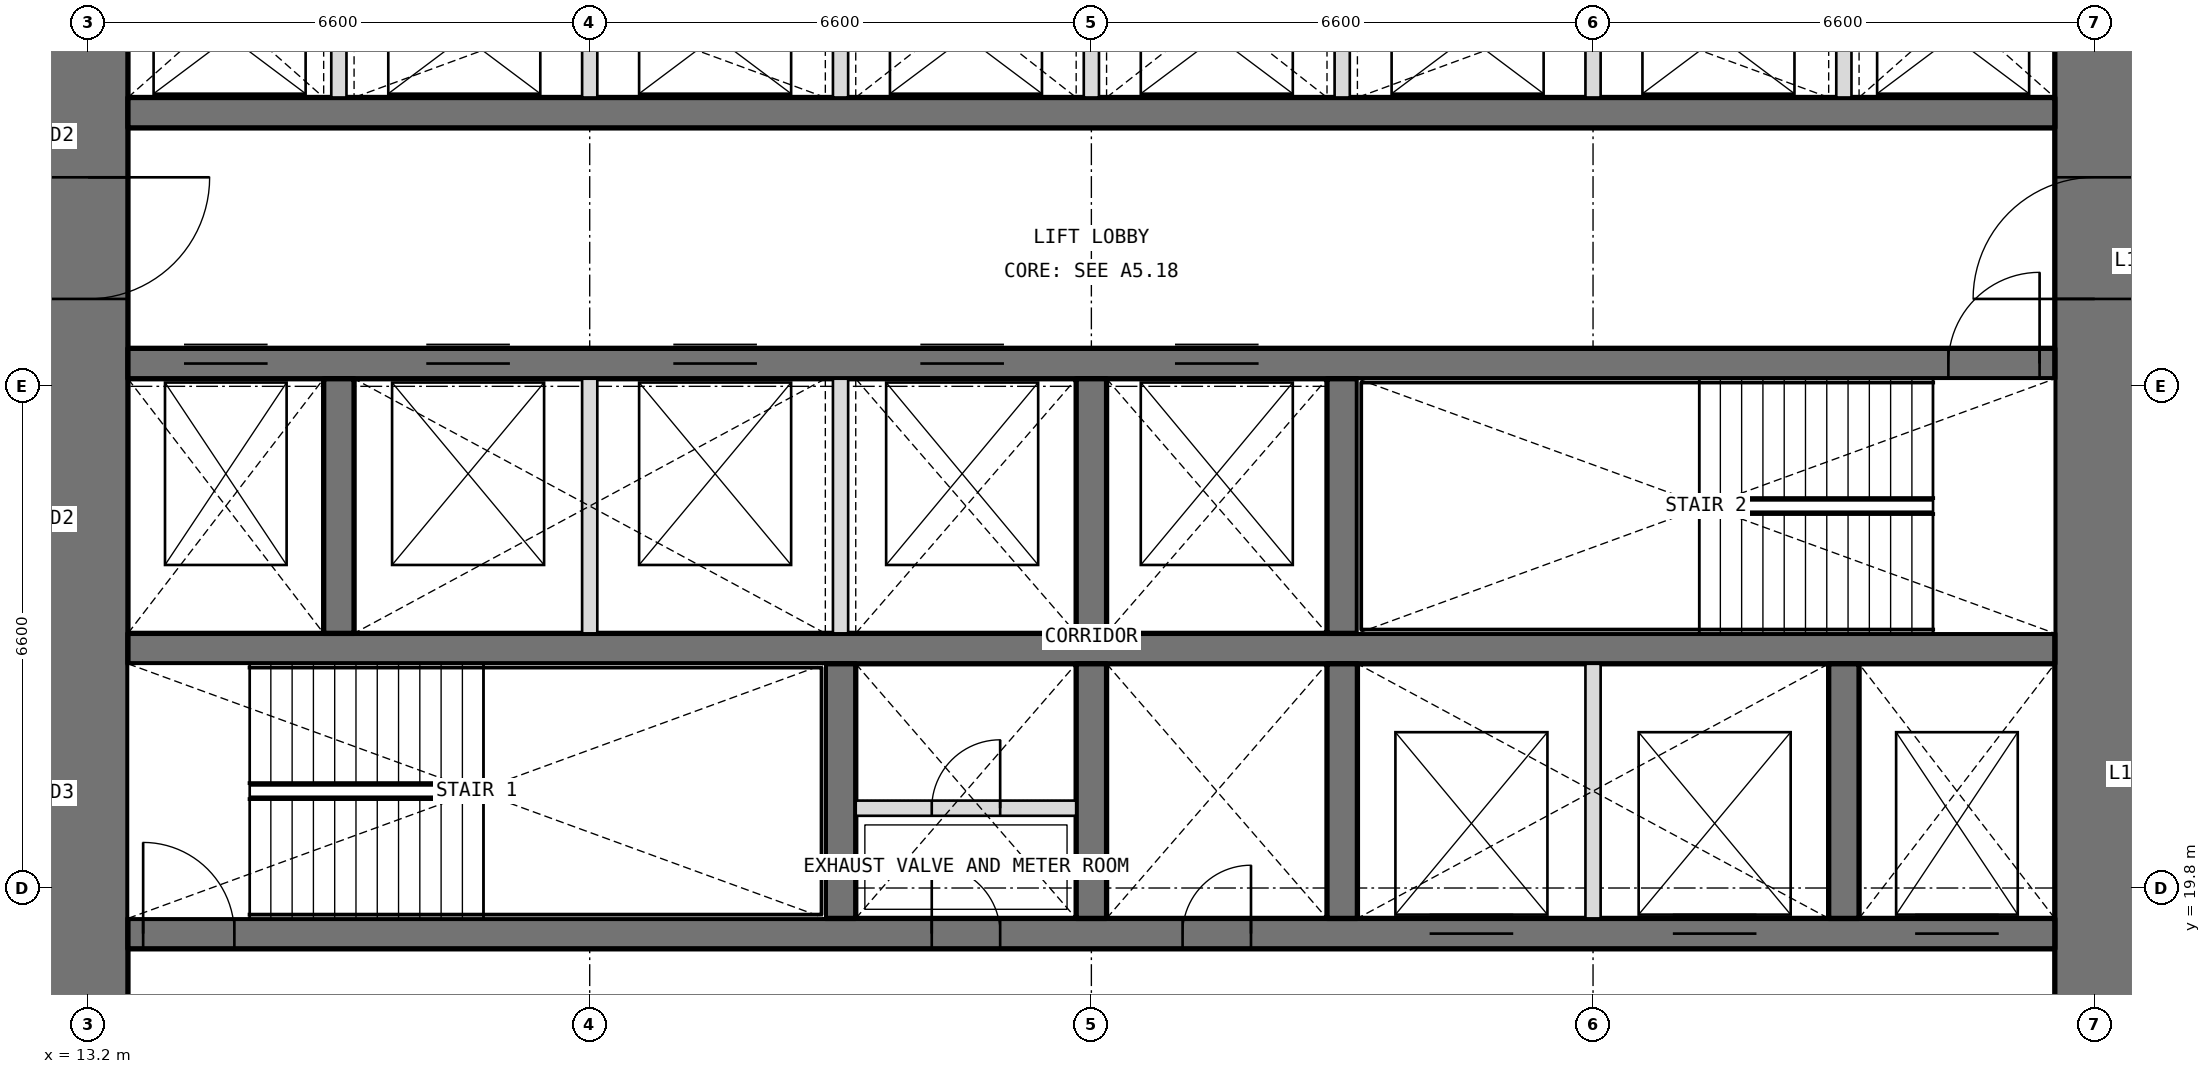
"""IFC4 building model, lengths in metres.
Left out: names, types, materials, properties, quantities, classifications, styles, units other than length and angle.
Written with IfcOpenShell. Run it as: python <this file> out.ifc"""

import sys

from ifc_helpers import new_model, si_unit, direction, frame, frame_2d, origin, place, context, subcontext, project, spatial, rectangle, extrude, element, fill, save


model = new_model("IFC4")
c1 = context("Model", 3, precision=1e-05, world=origin(), true_north=direction((0.0, 1.0)))
c2 = subcontext(c1, "Body", "Model", "MODEL_VIEW")
j1 = project(units=[si_unit("LENGTHUNIT", "METRE"), si_unit("PLANEANGLEUNIT", "RADIAN")], contexts=[c1])
p1 = place(None, origin())
s1 = spatial("IfcSite", under=j1, at=p1, CompositionType="ELEMENT")
p2 = place(p1, origin())
s2 = spatial("IfcBuilding", under=s1, at=p2, CompositionType="ELEMENT")
p3 = place(p2, frame((0.0, 0.0, 71.7)))
s3 = spatial("IfcBuildingStorey", under=s2, at=p3, CompositionType="ELEMENT", Elevation=71.7)
p4 = place(p3, frame((39.6, 13.725, 0.0), z_axis=(0.0, 0.0, 1.0), x_axis=(0.0, 1.0, 0.0)))
e1 = element("IfcWall", 1, at=p4, inside=s3, PredefinedType="SHEAR", context=c2, shape_type="SweptSolid", body=[
    extrude(rectangle(XDim=18.75, YDim=1.05, at=frame_2d((9.375, 0.0))), origin(), (0.0, 0.0, 1.0), 4.2),
])
p5 = place(p4, frame((3.025, 0.0, 0.0)))
e2 = element("IfcOpeningElement", 2, at=p5, cuts=e1, PredefinedType="OPENING", context=c2, shape_type="SweptSolid", body=[
    extrude(rectangle(XDim=1.6, YDim=2.1, at=frame_2d((0.8, 1.05))), frame((0.0, 0.535, 0.0), z_axis=(0.0, -1.0, 0.0), x_axis=(1.0, 0.0, 0.0)), (0.0, 0.0, 1.0), 1.07),
])
p6 = place(p4, frame((13.825, 0.0, 0.0)))
e3 = element("IfcOpeningElement", 3, at=p6, cuts=e1, PredefinedType="OPENING", context=c2, shape_type="SweptSolid", body=[
    extrude(rectangle(XDim=1.6, YDim=2.1, at=frame_2d((0.8, 1.05))), frame((0.0, 0.535, 0.0), z_axis=(0.0, -1.0, 0.0), x_axis=(1.0, 0.0, 0.0)), (0.0, 0.0, 1.0), 1.07),
])
p7 = place(p3, frame((13.2, 32.475, 0.0), z_axis=(0.0, 0.0, 1.0), x_axis=(0.0, -1.0, 0.0)))
e4 = element("IfcWall", 4, at=p7, inside=s3, PredefinedType="SHEAR", context=c2, shape_type="SweptSolid", body=[
    extrude(rectangle(XDim=18.75, YDim=1.05, at=frame_2d((9.375, 0.0))), origin(), (0.0, 0.0, 1.0), 4.2),
])
p8 = place(p7, frame((14.125, 0.0, 0.0)))
e5 = element("IfcOpeningElement", 5, at=p8, cuts=e4, PredefinedType="OPENING", context=c2, shape_type="SweptSolid", body=[
    extrude(rectangle(XDim=1.6, YDim=2.1, at=frame_2d((0.8, 1.05))), frame((0.0, 0.535, 0.0), z_axis=(0.0, -1.0, 0.0), x_axis=(1.0, 0.0, 0.0)), (0.0, 0.0, 1.0), 1.07),
])
p9 = place(p7, frame((3.325, 0.0, 0.0)))
e6 = element("IfcOpeningElement", 6, at=p9, cuts=e4, PredefinedType="OPENING", context=c2, shape_type="SweptSolid", body=[
    extrude(rectangle(XDim=1.6, YDim=2.1, at=frame_2d((0.8, 1.05))), frame((0.0, 0.535, 0.0), z_axis=(0.0, -1.0, 0.0), x_axis=(1.0, 0.0, 0.0)), (0.0, 0.0, 1.0), 1.07),
])
p10 = place(p3, frame((13.725, 19.2, 0.0), z_axis=(0.0, 0.0, 1.0), x_axis=(1.0, 0.0, 0.0)))
e7 = element("IfcWall", 7, at=p10, inside=s3, PredefinedType="SHEAR", context=c2, shape_type="SweptSolid", body=[
    extrude(rectangle(XDim=25.35, YDim=0.4, at=frame_2d((12.675, 0.0))), origin(), (0.0, 0.0, 1.0), 4.2),
])
p11 = place(p10, frame((10.575, 0.0, 0.0)))
e8 = element("IfcOpeningElement", 8, at=p11, cuts=e7, PredefinedType="OPENING", context=c2, shape_type="SweptSolid", body=[
    extrude(rectangle(XDim=0.9, YDim=2.1, at=frame_2d((0.45, 1.05))), frame((0.0, 0.21, 0.0), z_axis=(0.0, -1.0, 0.0), x_axis=(1.0, 0.0, 0.0)), (0.0, 0.0, 1.0), 0.42),
])
p12 = place(p10, frame((13.875, 0.0, 0.0)))
e9 = element("IfcOpeningElement", 9, at=p12, cuts=e7, PredefinedType="OPENING", context=c2, shape_type="SweptSolid", body=[
    extrude(rectangle(XDim=0.9, YDim=2.1, at=frame_2d((0.45, 1.05))), frame((0.0, 0.21, 0.0), z_axis=(0.0, -1.0, 0.0), x_axis=(1.0, 0.0, 0.0)), (0.0, 0.0, 1.0), 0.42),
])
p13 = place(p10, frame((0.2, 0.0, 0.0)))
e10 = element("IfcOpeningElement", 10, at=p13, cuts=e7, PredefinedType="OPENING", context=c2, shape_type="SweptSolid", body=[
    extrude(rectangle(XDim=1.2, YDim=2.1, at=frame_2d((0.6, 1.05))), frame((0.0, 0.21, 0.0), z_axis=(0.0, -1.0, 0.0), x_axis=(1.0, 0.0, 0.0)), (0.0, 0.0, 1.0), 0.42),
])
p14 = place(p10, frame((23.512, 0.0, 0.0)))
e11 = element("IfcOpeningElement", 11, at=p14, cuts=e7, PredefinedType="OPENING", context=c2, shape_type="SweptSolid", body=[
    extrude(rectangle(XDim=1.1, YDim=2.1, at=frame_2d((0.55, 1.05))), frame((0.0, 0.21, 0.0), z_axis=(0.0, -1.0, 0.0), x_axis=(1.0, 0.0, 0.0)), (0.0, 0.0, 1.0), 0.42),
])
p15 = place(p10, frame((17.125, 0.0, 0.0)))
e12 = element("IfcOpeningElement", 12, at=p15, cuts=e7, PredefinedType="OPENING", context=c2, shape_type="SweptSolid", body=[
    extrude(rectangle(XDim=1.1, YDim=2.1, at=frame_2d((0.55, 1.05))), frame((0.0, 0.21, 0.0), z_axis=(0.0, -1.0, 0.0), x_axis=(1.0, 0.0, 0.0)), (0.0, 0.0, 1.0), 0.42),
])
p16 = place(p10, frame((20.325, 0.0, 0.0)))
e13 = element("IfcOpeningElement", 13, at=p16, cuts=e7, PredefinedType="OPENING", context=c2, shape_type="SweptSolid", body=[
    extrude(rectangle(XDim=1.1, YDim=2.1, at=frame_2d((0.55, 1.05))), frame((0.0, 0.21, 0.0), z_axis=(0.0, -1.0, 0.0), x_axis=(1.0, 0.0, 0.0)), (0.0, 0.0, 1.0), 0.42),
])
p17 = place(p3, frame((13.725, 22.95, 0.0), z_axis=(0.0, 0.0, 1.0), x_axis=(1.0, 0.0, 0.0)))
e14 = element("IfcWall", 14, at=p17, inside=s3, PredefinedType="SHEAR", context=c2, shape_type="SweptSolid", body=[
    extrude(rectangle(XDim=25.35, YDim=0.4, at=frame_2d((12.675, 0.0))), origin(), (0.0, 0.0, 1.0), 4.2),
])
p18 = place(p3, frame((13.725, 26.7, 0.0), z_axis=(0.0, 0.0, 1.0), x_axis=(1.0, 0.0, 0.0)))
e15 = element("IfcWall", 15, at=p18, inside=s3, PredefinedType="SHEAR", context=c2, shape_type="SweptSolid", body=[
    extrude(rectangle(XDim=25.35, YDim=0.4, at=frame_2d((12.675, 0.0))), origin(), (0.0, 0.0, 1.0), 4.2),
])
p19 = place(p18, frame((23.95, 0.0, 0.0)))
e16 = element("IfcOpeningElement", 16, at=p19, cuts=e15, PredefinedType="OPENING", context=c2, shape_type="SweptSolid", body=[
    extrude(rectangle(XDim=1.2, YDim=2.1, at=frame_2d((0.6, 1.05))), frame((0.0, 0.21, 0.0), z_axis=(0.0, -1.0, 0.0), x_axis=(1.0, 0.0, 0.0)), (0.0, 0.0, 1.0), 0.42),
])
p20 = place(p18, frame((0.738, 0.0, 0.0)))
e17 = element("IfcOpeningElement", 17, at=p20, cuts=e15, PredefinedType="OPENING", context=c2, shape_type="SweptSolid", body=[
    extrude(rectangle(XDim=1.1, YDim=2.1, at=frame_2d((0.55, 1.05))), frame((0.0, 0.21, 0.0), z_axis=(0.0, -1.0, 0.0), x_axis=(1.0, 0.0, 0.0)), (0.0, 0.0, 1.0), 0.42),
])
p21 = place(p18, frame((3.925, 0.0, 0.0)))
e18 = element("IfcOpeningElement", 18, at=p21, cuts=e15, PredefinedType="OPENING", context=c2, shape_type="SweptSolid", body=[
    extrude(rectangle(XDim=1.1, YDim=2.1, at=frame_2d((0.55, 1.05))), frame((0.0, 0.21, 0.0), z_axis=(0.0, -1.0, 0.0), x_axis=(1.0, 0.0, 0.0)), (0.0, 0.0, 1.0), 0.42),
])
p22 = place(p18, frame((7.175, 0.0, 0.0)))
e19 = element("IfcOpeningElement", 19, at=p22, cuts=e15, PredefinedType="OPENING", context=c2, shape_type="SweptSolid", body=[
    extrude(rectangle(XDim=1.1, YDim=2.1, at=frame_2d((0.55, 1.05))), frame((0.0, 0.21, 0.0), z_axis=(0.0, -1.0, 0.0), x_axis=(1.0, 0.0, 0.0)), (0.0, 0.0, 1.0), 0.42),
])
p23 = place(p18, frame((10.425, 0.0, 0.0)))
e20 = element("IfcOpeningElement", 20, at=p23, cuts=e15, PredefinedType="OPENING", context=c2, shape_type="SweptSolid", body=[
    extrude(rectangle(XDim=1.1, YDim=2.1, at=frame_2d((0.55, 1.05))), frame((0.0, 0.21, 0.0), z_axis=(0.0, -1.0, 0.0), x_axis=(1.0, 0.0, 0.0)), (0.0, 0.0, 1.0), 0.42),
])
p24 = place(p18, frame((13.775, 0.0, 0.0)))
e21 = element("IfcOpeningElement", 21, at=p24, cuts=e15, PredefinedType="OPENING", context=c2, shape_type="SweptSolid", body=[
    extrude(rectangle(XDim=1.1, YDim=2.1, at=frame_2d((0.55, 1.05))), frame((0.0, 0.21, 0.0), z_axis=(0.0, -1.0, 0.0), x_axis=(1.0, 0.0, 0.0)), (0.0, 0.0, 1.0), 0.42),
])
p25 = place(p3, frame((13.725, 30.0, 0.0), z_axis=(0.0, 0.0, 1.0), x_axis=(1.0, 0.0, 0.0)))
e22 = element("IfcWall", 22, at=p25, inside=s3, PredefinedType="SHEAR", context=c2, shape_type="SweptSolid", body=[
    extrude(rectangle(XDim=25.35, YDim=0.4, at=frame_2d((12.675, 0.0))), origin(), (0.0, 0.0, 1.0), 4.2),
])
for number, where, z_axis, x_axis in (
    (23, (23.1, 19.4, 0.0), (0.0, 0.0, 1.0), (0.0, 1.0, 0.0)),
    (24, (26.4, 19.4, 0.0), (0.0, 0.0, 1.0), (0.0, 1.0, 0.0)),
    (25, (29.7, 19.4, 0.0), (0.0, 0.0, 1.0), (0.0, 1.0, 0.0)),
    (26, (36.3, 19.4, 0.0), (0.0, 0.0, 1.0), (0.0, 1.0, 0.0)),
    (27, (16.5, 23.15, 0.0), (0.0, 0.0, 1.0), (0.0, 1.0, 0.0)),
    (28, (26.4, 23.15, 0.0), (0.0, 0.0, 1.0), (0.0, 1.0, 0.0)),
    (29, (29.7, 23.15, 0.0), (0.0, 0.0, 1.0), (0.0, 1.0, 0.0)),
):
    element("IfcWall", number, at=place(p3, frame(where, z_axis=z_axis, x_axis=x_axis)), inside=s3, PredefinedType="SHEAR", context=c2, shape_type="SweptSolid", body=[
        extrude(rectangle(XDim=3.35, YDim=0.4, at=frame_2d((1.675, 0.0))), origin(), (0.0, 0.0, 1.0), 4.2),
    ])
for number, where, z_axis, x_axis in (
    (30, (16.5, 30.2, 0.0), (0.0, 0.0, 1.0), (0.0, 1.0, 0.0)),
    (31, (19.8, 30.2, 0.0), (0.0, 0.0, 1.0), (0.0, 1.0, 0.0)),
    (32, (23.1, 30.2, 0.0), (0.0, 0.0, 1.0), (0.0, 1.0, 0.0)),
    (33, (26.4, 30.2, 0.0), (0.0, 0.0, 1.0), (0.0, 1.0, 0.0)),
    (34, (29.7, 30.2, 0.0), (0.0, 0.0, 1.0), (0.0, 1.0, 0.0)),
    (35, (33.0, 30.2, 0.0), (0.0, 0.0, 1.0), (0.0, 1.0, 0.0)),
    (36, (36.3, 30.2, 0.0), (0.0, 0.0, 1.0), (0.0, 1.0, 0.0)),
):
    element("IfcWall", number, at=place(p3, frame(where, z_axis=z_axis, x_axis=x_axis)), inside=s3, PredefinedType="PARTITIONING", context=c2, shape_type="SweptSolid", body=[
        extrude(rectangle(XDim=2.275, YDim=0.2, at=frame_2d((1.138, 0.0))), origin(), (0.0, 0.0, 1.0), 4.2),
    ])
for number, where, z_axis, x_axis in (
    (37, (33.0, 19.4, 0.0), (0.0, 0.0, 1.0), (0.0, 1.0, 0.0)),
    (38, (19.8, 23.15, 0.0), (0.0, 0.0, 1.0), (0.0, 1.0, 0.0)),
    (39, (23.1, 23.15, 0.0), (0.0, 0.0, 1.0), (0.0, 1.0, 0.0)),
):
    element("IfcWall", number, at=place(p3, frame(where, z_axis=z_axis, x_axis=x_axis)), inside=s3, PredefinedType="PARTITIONING", context=c2, shape_type="SweptSolid", body=[
        extrude(rectangle(XDim=3.35, YDim=0.2, at=frame_2d((1.675, 0.0))), origin(), (0.0, 0.0, 1.0), 4.2),
    ])
p26 = place(p3, frame((23.3, 20.85, 0.0), z_axis=(0.0, 0.0, 1.0), x_axis=(1.0, 0.0, 0.0)))
e40 = element("IfcWall", 40, at=p26, inside=s3, PredefinedType="PARTITIONING", context=c2, shape_type="SweptSolid", body=[
    extrude(rectangle(XDim=2.9, YDim=0.2, at=frame_2d((1.45, 0.0))), origin(), (0.0, 0.0, 1.0), 3.85),
])
p27 = place(p26, frame((1.0, 0.0, 0.0)))
e41 = element("IfcOpeningElement", 41, at=p27, cuts=e40, PredefinedType="OPENING", context=c2, shape_type="SweptSolid", body=[
    extrude(rectangle(XDim=0.9, YDim=2.1, at=frame_2d((0.45, 1.05))), frame((0.0, 0.11, 0.0), z_axis=(0.0, -1.0, 0.0), x_axis=(1.0, 0.0, 0.0)), (0.0, 0.0, 1.0), 0.22),
])
p28 = place(p11, origin())
e42 = element("IfcDoor", 42, at=p28, inside=s3, OperationType="SINGLE_SWING_LEFT", PredefinedType="DOOR", context=c2, shape_type="SweptSolid", body=[
    extrude(rectangle(XDim=0.9, YDim=2.1, at=frame_2d((0.45, 1.05))), frame((0.0, 0.025, 0.0), z_axis=(0.0, -1.0, 0.0), x_axis=(1.0, 0.0, 0.0)), (0.0, 0.0, 1.0), 0.05),
])
fill(e8, e42)
p29 = place(p27, origin())
e43 = element("IfcDoor", 43, at=p29, inside=s3, OperationType="SINGLE_SWING_RIGHT", PredefinedType="DOOR", context=c2, shape_type="SweptSolid", body=[
    extrude(rectangle(XDim=0.9, YDim=2.1, at=frame_2d((0.45, 1.05))), frame((0.0, 0.025, 0.0), z_axis=(0.0, -1.0, 0.0), x_axis=(1.0, 0.0, 0.0)), (0.0, 0.0, 1.0), 0.05),
])
fill(e41, e43)
p30 = place(p12, origin())
e44 = element("IfcDoor", 44, at=p30, inside=s3, OperationType="SINGLE_SWING_RIGHT", PredefinedType="DOOR", context=c2, shape_type="SweptSolid", body=[
    extrude(rectangle(XDim=0.9, YDim=2.1, at=frame_2d((0.45, 1.05))), frame((0.0, 0.025, 0.0), z_axis=(0.0, -1.0, 0.0), x_axis=(1.0, 0.0, 0.0)), (0.0, 0.0, 1.0), 0.05),
])
fill(e9, e44)
p31 = place(p13, origin())
e45 = element("IfcDoor", 45, at=p31, inside=s3, OperationType="SINGLE_SWING_LEFT", PredefinedType="DOOR", context=c2, shape_type="SweptSolid", body=[
    extrude(rectangle(XDim=1.2, YDim=2.1, at=frame_2d((0.6, 1.05))), frame((0.0, 0.025, 0.0), z_axis=(0.0, -1.0, 0.0), x_axis=(1.0, 0.0, 0.0)), (0.0, 0.0, 1.0), 0.05),
])
fill(e10, e45)
p32 = place(p19, origin())
e46 = element("IfcDoor", 46, at=p32, inside=s3, OperationType="SINGLE_SWING_RIGHT", PredefinedType="DOOR", context=c2, shape_type="SweptSolid", body=[
    extrude(rectangle(XDim=1.2, YDim=2.1, at=frame_2d((0.6, 1.05))), frame((0.0, 0.025, 0.0), z_axis=(0.0, -1.0, 0.0), x_axis=(1.0, 0.0, 0.0)), (0.0, 0.0, 1.0), 0.05),
])
fill(e16, e46)
p33 = place(p9, origin())
e47 = element("IfcDoor", 47, at=p33, inside=s3, OperationType="DOUBLE_DOOR_DOUBLE_SWING", PredefinedType="DOOR", context=c2, shape_type="SweptSolid", body=[
    extrude(rectangle(XDim=1.6, YDim=2.1, at=frame_2d((0.8, 1.05))), frame((0.0, 0.025, 0.0), z_axis=(0.0, -1.0, 0.0), x_axis=(1.0, 0.0, 0.0)), (0.0, 0.0, 1.0), 0.05),
])
fill(e6, e47)
p34 = place(p6, origin())
e48 = element("IfcDoor", 48, at=p34, inside=s3, OperationType="DOUBLE_DOOR_DOUBLE_SWING", PredefinedType="DOOR", context=c2, shape_type="SweptSolid", body=[
    extrude(rectangle(XDim=1.6, YDim=2.1, at=frame_2d((0.8, 1.05))), frame((0.0, 0.025, 0.0), z_axis=(0.0, -1.0, 0.0), x_axis=(1.0, 0.0, 0.0)), (0.0, 0.0, 1.0), 0.05),
])
fill(e3, e48)
p35 = place(p20, origin())
e49 = element("IfcDoor", 49, at=p35, inside=s3, OperationType="DOUBLE_DOOR_SLIDING", PredefinedType="DOOR", context=c2, shape_type="SweptSolid", body=[
    extrude(rectangle(XDim=1.1, YDim=2.1, at=frame_2d((0.55, 1.05))), frame((0.0, 0.025, 0.0), z_axis=(0.0, -1.0, 0.0), x_axis=(1.0, 0.0, 0.0)), (0.0, 0.0, 1.0), 0.05),
])
fill(e17, e49)
p36 = place(p14, origin())
e50 = element("IfcDoor", 50, at=p36, inside=s3, OperationType="DOUBLE_DOOR_SLIDING", PredefinedType="DOOR", context=c2, shape_type="SweptSolid", body=[
    extrude(rectangle(XDim=1.1, YDim=2.1, at=frame_2d((0.55, 1.05))), frame((0.0, 0.025, 0.0), z_axis=(0.0, -1.0, 0.0), x_axis=(1.0, 0.0, 0.0)), (0.0, 0.0, 1.0), 0.05),
])
fill(e11, e50)
p37 = place(p15, origin())
e51 = element("IfcDoor", 51, at=p37, inside=s3, OperationType="DOUBLE_DOOR_SLIDING", PredefinedType="DOOR", context=c2, shape_type="SweptSolid", body=[
    extrude(rectangle(XDim=1.1, YDim=2.1, at=frame_2d((0.55, 1.05))), frame((0.0, 0.025, 0.0), z_axis=(0.0, -1.0, 0.0), x_axis=(1.0, 0.0, 0.0)), (0.0, 0.0, 1.0), 0.05),
])
fill(e12, e51)
p38 = place(p16, origin())
e52 = element("IfcDoor", 52, at=p38, inside=s3, OperationType="DOUBLE_DOOR_SLIDING", PredefinedType="DOOR", context=c2, shape_type="SweptSolid", body=[
    extrude(rectangle(XDim=1.1, YDim=2.1, at=frame_2d((0.55, 1.05))), frame((0.0, 0.025, 0.0), z_axis=(0.0, -1.0, 0.0), x_axis=(1.0, 0.0, 0.0)), (0.0, 0.0, 1.0), 0.05),
])
fill(e13, e52)
p39 = place(p21, origin())
e53 = element("IfcDoor", 53, at=p39, inside=s3, OperationType="DOUBLE_DOOR_SLIDING", PredefinedType="DOOR", context=c2, shape_type="SweptSolid", body=[
    extrude(rectangle(XDim=1.1, YDim=2.1, at=frame_2d((0.55, 1.05))), frame((0.0, 0.025, 0.0), z_axis=(0.0, -1.0, 0.0), x_axis=(1.0, 0.0, 0.0)), (0.0, 0.0, 1.0), 0.05),
])
fill(e18, e53)
p40 = place(p22, origin())
e54 = element("IfcDoor", 54, at=p40, inside=s3, OperationType="DOUBLE_DOOR_SLIDING", PredefinedType="DOOR", context=c2, shape_type="SweptSolid", body=[
    extrude(rectangle(XDim=1.1, YDim=2.1, at=frame_2d((0.55, 1.05))), frame((0.0, 0.025, 0.0), z_axis=(0.0, -1.0, 0.0), x_axis=(1.0, 0.0, 0.0)), (0.0, 0.0, 1.0), 0.05),
])
fill(e19, e54)
p41 = place(p23, origin())
e55 = element("IfcDoor", 55, at=p41, inside=s3, OperationType="DOUBLE_DOOR_SLIDING", PredefinedType="DOOR", context=c2, shape_type="SweptSolid", body=[
    extrude(rectangle(XDim=1.1, YDim=2.1, at=frame_2d((0.55, 1.05))), frame((0.0, 0.025, 0.0), z_axis=(0.0, -1.0, 0.0), x_axis=(1.0, 0.0, 0.0)), (0.0, 0.0, 1.0), 0.05),
])
fill(e20, e55)
p42 = place(p24, origin())
e56 = element("IfcDoor", 56, at=p42, inside=s3, OperationType="DOUBLE_DOOR_SLIDING", PredefinedType="DOOR", context=c2, shape_type="SweptSolid", body=[
    extrude(rectangle(XDim=1.1, YDim=2.1, at=frame_2d((0.55, 1.05))), frame((0.0, 0.025, 0.0), z_axis=(0.0, -1.0, 0.0), x_axis=(1.0, 0.0, 0.0)), (0.0, 0.0, 1.0), 0.05),
])
fill(e21, e56)
save(model, sys.argv[1])
